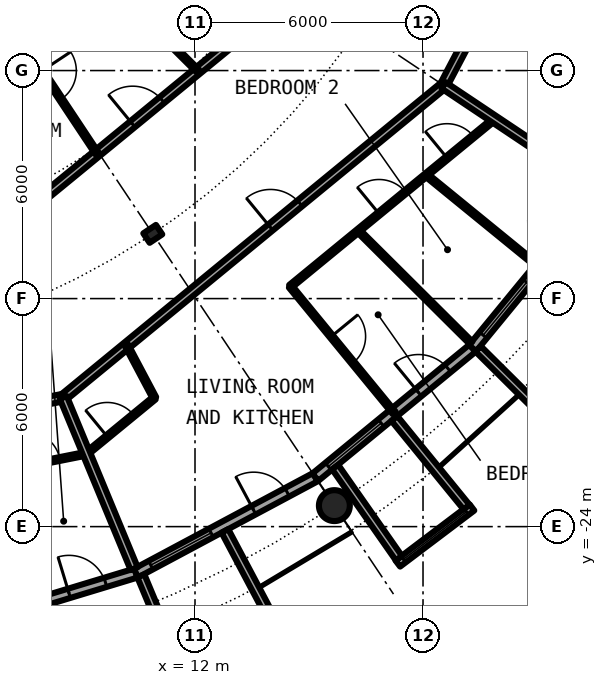
"""IFC4 building model, lengths in metres.
Left out: names, types, materials, properties, quantities, classifications, styles, units other than length and angle.
Written with IfcOpenShell. Run it as: python <this file> out.ifc"""

import sys

from ifc_helpers import new_model, si_unit, direction, frame, frame_2d, origin, origin_2d, place, context, subcontext, project, spatial, rectangle, circle, hollow_circle, i_section, extrude, element, fill, save


model = new_model("IFC4")
c1 = context("Model", 3, precision=1e-05, world=origin(), true_north=direction((0.0, 1.0)))
c2 = subcontext(c1, "Body", "Model", "MODEL_VIEW")
j1 = project(units=[si_unit("LENGTHUNIT", "METRE"), si_unit("PLANEANGLEUNIT", "RADIAN")], contexts=[c1])
p1 = place(None, origin())
s1 = spatial("IfcSite", under=j1, at=p1, CompositionType="ELEMENT")
p2 = place(p1, origin())
s2 = spatial("IfcBuilding", under=s1, at=p2, CompositionType="ELEMENT")
p3 = place(p2, frame((0.0, 0.0, 199.35)))
s3 = spatial("IfcBuildingStorey", under=s2, at=p3, CompositionType="ELEMENT", Elevation=199.35)
p4 = place(p3, frame((15.667, -23.448, 0.0), z_axis=(0.0, 0.0, 1.0), x_axis=(1.0, 0.0, 0.0)))
e1 = element("IfcColumn", 1, at=p4, inside=s3, PredefinedType="COLUMN", context=c2, shape_type="SweptSolid", body=[
    extrude(hollow_circle(Radius=0.406, WallThickness=0.03, at=origin_2d()), origin(), (0.0, 0.0, 1.0), 3.05),
])
p5 = place(p3, frame((10.889, -16.297, 0.0), z_axis=(0.0, 0.0, 1.0), x_axis=(0.55557023302, -0.831469612303, 0.0)))
e2 = element("IfcColumn", 2, at=p5, inside=s3, PredefinedType="COLUMN", context=c2, shape_type="SweptSolid", body=[
    extrude(i_section(OverallWidth=0.3, OverallDepth=0.4, WebThickness=0.013, FlangeThickness=0.024, FilletRadius=0.027, at=origin_2d()), origin(), (0.0, 0.0, 1.0), 3.05),
])
p6 = place(p3, frame((5.326, -26.775, 0.0), z_axis=(0.0, 0.0, 1.0), x_axis=(0.956965678721, 0.290201119486, 0.0)))
e3 = element("IfcWall", 3, at=p6, inside=s3, PredefinedType="SOLIDWALL", context=c2, shape_type="SweptSolid", body=[
    extrude(rectangle(XDim=5.351, YDim=0.25, at=frame_2d((2.676, 0.0))), origin(), (0.0, 0.0, 1.0), 2.7),
])
p7 = place(p6, frame((0.441, 0.0, 0.3)))
e4 = element("IfcOpeningElement", 4, at=p7, cuts=e3, PredefinedType="OPENING", context=c2, shape_type="SweptSolid", body=[
    extrude(rectangle(XDim=1.8, YDim=2.1, at=frame_2d((0.9, 1.05))), frame((0.0, 0.135, 0.0), z_axis=(0.0, -1.0, 0.0), x_axis=(1.0, 0.0, 0.0)), (0.0, 0.0, 1.0), 0.27),
])
p8 = place(p6, frame((3.51, 0.0, 0.0)))
e5 = element("IfcOpeningElement", 5, at=p8, cuts=e3, PredefinedType="OPENING", context=c2, shape_type="SweptSolid", body=[
    extrude(rectangle(XDim=1.0, YDim=2.2, at=frame_2d((0.5, 1.1))), frame((0.0, 0.135, 0.0), z_axis=(0.0, -1.0, 0.0), x_axis=(1.0, 0.0, 0.0)), (0.0, 0.0, 1.0), 0.27),
])
p9 = place(p3, frame((10.447, -25.222, 0.0), z_axis=(0.0, 0.0, 1.0), x_axis=(0.881915646801, 0.471407246368, 0.0)))
e6 = element("IfcWall", 6, at=p9, inside=s3, PredefinedType="SOLIDWALL", context=c2, shape_type="SweptSolid", body=[
    extrude(rectangle(XDim=5.352, YDim=0.25, at=frame_2d((2.676, 0.0))), origin(), (0.0, 0.0, 1.0), 2.7),
])
p10 = place(p9, frame((0.441, 0.0, 0.3)))
e7 = element("IfcOpeningElement", 7, at=p10, cuts=e6, PredefinedType="OPENING", context=c2, shape_type="SweptSolid", body=[
    extrude(rectangle(XDim=1.8, YDim=2.1, at=frame_2d((0.9, 1.05))), frame((0.0, 0.135, 0.0), z_axis=(0.0, -1.0, 0.0), x_axis=(1.0, 0.0, 0.0)), (0.0, 0.0, 1.0), 0.27),
])
p11 = place(p9, frame((3.51, 0.0, 0.0)))
e8 = element("IfcOpeningElement", 8, at=p11, cuts=e6, PredefinedType="OPENING", context=c2, shape_type="SweptSolid", body=[
    extrude(rectangle(XDim=1.0, YDim=2.2, at=frame_2d((0.5, 1.1))), frame((0.0, 0.135, 0.0), z_axis=(0.0, -1.0, 0.0), x_axis=(1.0, 0.0, 0.0)), (0.0, 0.0, 1.0), 0.27),
])
p12 = place(p3, frame((10.575, -25.295, -0.03), z_axis=(0.0, 0.0, 1.0), x_axis=(0.385697364644, -0.922625353492, 0.0)))
e9 = element("IfcWall", 9, at=p12, inside=s3, PredefinedType="SOLIDWALL", context=c2, shape_type="SweptSolid", body=[
    extrude(rectangle(XDim=2.883, YDim=0.2, at=frame_2d((1.442, 0.0))), origin(), (0.0, 0.0, 1.0), 2.73),
])
p13 = place(p3, frame((12.787, -24.113, -0.03), z_axis=(0.0, 0.0, 1.0), x_axis=(0.468365282436, -0.883534924159, 0.0)))
e10 = element("IfcWall", 10, at=p13, inside=s3, PredefinedType="SOLIDWALL", context=c2, shape_type="SweptSolid", body=[
    extrude(rectangle(XDim=3.006, YDim=0.2, at=frame_2d((1.503, 0.0))), origin(), (0.0, 0.0, 1.0), 2.73),
])
p14 = place(p3, frame((15.167, -22.699, 0.0), z_axis=(0.0, 0.0, 1.0), x_axis=(0.773019449054, 0.634382322723, 0.0)))
e11 = element("IfcWall", 11, at=p14, inside=s3, PredefinedType="SOLIDWALL", context=c2, shape_type="SweptSolid", body=[
    extrude(rectangle(XDim=5.352, YDim=0.25, at=frame_2d((2.676, 0.0))), origin(), (0.0, 0.0, 1.0), 2.7),
])
p15 = place(p14, frame((0.441, 0.0, 0.3)))
e12 = element("IfcOpeningElement", 12, at=p15, cuts=e11, PredefinedType="OPENING", context=c2, shape_type="SweptSolid", body=[
    extrude(rectangle(XDim=1.8, YDim=2.1, at=frame_2d((0.9, 1.05))), frame((0.0, 0.135, 0.0), z_axis=(0.0, -1.0, 0.0), x_axis=(1.0, 0.0, 0.0)), (0.0, 0.0, 1.0), 0.27),
])
p16 = place(p14, frame((3.51, 0.0, 0.0)))
e13 = element("IfcOpeningElement", 13, at=p16, cuts=e11, PredefinedType="OPENING", context=c2, shape_type="SweptSolid", body=[
    extrude(rectangle(XDim=1.0, YDim=2.2, at=frame_2d((0.5, 1.1))), frame((0.0, 0.135, 0.0), z_axis=(0.0, -1.0, 0.0), x_axis=(1.0, 0.0, 0.0)), (0.0, 0.0, 1.0), 0.27),
])
p17 = place(p3, frame((17.337, -24.972, -0.03), z_axis=(0.0, 0.0, 1.0), x_axis=(0.797887588059, 0.602806268067, 0.0)))
e14 = element("IfcWall", 14, at=p17, inside=s3, PredefinedType="SOLIDWALL", context=c2, shape_type="SweptSolid", body=[
    extrude(rectangle(XDim=2.447, YDim=0.2, at=frame_2d((1.223, 0.0))), origin(), (0.0, 0.0, 1.0), 2.73),
])
p18 = place(p17, frame((0.183, 0.0, 0.33)))
e15 = element("IfcOpeningElement", 15, at=p18, cuts=e14, PredefinedType="OPENING", context=c2, shape_type="SweptSolid", body=[
    extrude(circle(Radius=1.04, at=frame_2d((1.04, 1.04))), frame((0.0, 0.11, 0.0), z_axis=(0.0, -1.0, 0.0), x_axis=(1.0, 0.0, 0.0)), (0.0, 0.0, 1.0), 0.22),
])
p19 = place(p3, frame((15.688, -22.433, -0.03), z_axis=(0.0, 0.0, 1.0), x_axis=(0.573260687834, -0.819373043115, 0.0)))
e16 = element("IfcWall", 16, at=p19, inside=s3, PredefinedType="SOLIDWALL", context=c2, shape_type="SweptSolid", body=[
    extrude(rectangle(XDim=2.925, YDim=0.2, at=frame_2d((1.463, 0.0))), origin(), (0.0, 0.0, 1.0), 2.73),
])
p20 = place(p3, frame((17.246, -21.155, -0.03), z_axis=(0.0, 0.0, 1.0), x_axis=(0.631741648902, -0.775179004516, 0.0)))
e17 = element("IfcWall", 17, at=p20, inside=s3, PredefinedType="SOLIDWALL", context=c2, shape_type="SweptSolid", body=[
    extrude(rectangle(XDim=3.006, YDim=0.2, at=frame_2d((1.503, 0.0))), origin(), (0.0, 0.0, 1.0), 2.73),
])
p21 = place(p3, frame((19.304, -19.304, 0.0), z_axis=(0.0, 0.0, 1.0), x_axis=(0.634382322723, 0.773019449054, 0.0)))
e18 = element("IfcWall", 18, at=p21, inside=s3, PredefinedType="SOLIDWALL", context=c2, shape_type="SweptSolid", body=[
    extrude(rectangle(XDim=5.352, YDim=0.25, at=frame_2d((2.676, 0.0))), origin(), (0.0, 0.0, 1.0), 2.7),
])
p22 = place(p21, frame((0.441, 0.0, 0.3)))
e19 = element("IfcOpeningElement", 19, at=p22, cuts=e18, PredefinedType="OPENING", context=c2, shape_type="SweptSolid", body=[
    extrude(rectangle(XDim=1.8, YDim=2.1, at=frame_2d((0.9, 1.05))), frame((0.0, 0.135, 0.0), z_axis=(0.0, -1.0, 0.0), x_axis=(1.0, 0.0, 0.0)), (0.0, 0.0, 1.0), 0.27),
])
p23 = place(p21, frame((3.51, 0.0, 0.0)))
e20 = element("IfcOpeningElement", 20, at=p23, cuts=e18, PredefinedType="OPENING", context=c2, shape_type="SweptSolid", body=[
    extrude(rectangle(XDim=1.0, YDim=2.2, at=frame_2d((0.5, 1.1))), frame((0.0, 0.135, 0.0), z_axis=(0.0, -1.0, 0.0), x_axis=(1.0, 0.0, 0.0)), (0.0, 0.0, 1.0), 0.27),
])
p24 = place(p3, frame((19.45, -19.323, -0.03), z_axis=(0.0, 0.0, 1.0), x_axis=(0.709727076896, -0.704476739375, 0.0)))
e21 = element("IfcWall", 21, at=p24, inside=s3, PredefinedType="SOLIDWALL", context=c2, shape_type="SweptSolid", body=[
    extrude(rectangle(XDim=2.883, YDim=0.2, at=frame_2d((1.441, 0.0))), origin(), (0.0, 0.0, 1.0), 2.73),
])
p25 = place(p3, frame((4.577, -22.989, 0.0), z_axis=(0.0, 0.0, 1.0), x_axis=(0.980813600024, 0.194947895622, 0.0)))
e22 = element("IfcWall", 22, at=p25, inside=s3, PredefinedType="PARTITIONING", context=c2, shape_type="SweptSolid", body=[
    extrude(rectangle(XDim=4.662, YDim=0.1, at=frame_2d((2.331, 0.0))), origin(), (0.0, 0.0, 1.0), 2.7),
])
p26 = place(p25, frame((3.043, 0.0, 0.0)))
e23 = element("IfcOpeningElement", 23, at=p26, cuts=e22, PredefinedType="OPENING", context=c2, shape_type="SweptSolid", body=[
    extrude(rectangle(XDim=0.9, YDim=2.3, at=frame_2d((0.45, 1.15))), frame((0.0, 0.06, 0.0), z_axis=(0.0, -1.0, 0.0), x_axis=(1.0, 0.0, 0.0)), (0.0, 0.0, 1.0), 0.12),
])
p27 = place(p3, frame((9.146, -22.081, 0.0), z_axis=(0.0, 0.0, 1.0), x_axis=(0.773095932958, 0.634289112663, 0.0)))
e24 = element("IfcWall", 24, at=p27, inside=s3, PredefinedType="PARTITIONING", context=c2, shape_type="SweptSolid", body=[
    extrude(rectangle(XDim=2.313, YDim=0.1, at=frame_2d((1.156, 0.0))), origin(), (0.0, 0.0, 1.0), 2.7),
])
p28 = place(p27, frame((0.706, 0.0, 0.0)))
e25 = element("IfcOpeningElement", 25, at=p28, cuts=e24, PredefinedType="OPENING", context=c2, shape_type="SweptSolid", body=[
    extrude(rectangle(XDim=0.9, YDim=2.3, at=frame_2d((0.45, 1.15))), frame((0.0, 0.06, 0.0), z_axis=(0.0, -1.0, 0.0), x_axis=(1.0, 0.0, 0.0)), (0.0, 0.0, 1.0), 0.12),
])
p29 = place(p3, frame((14.508, -17.681, 0.0), z_axis=(0.0, 0.0, 1.0), x_axis=(0.773155647559, 0.634216323227, 0.0)))
e26 = element("IfcWall", 26, at=p29, inside=s3, PredefinedType="PARTITIONING", context=c2, shape_type="SweptSolid", body=[
    extrude(rectangle(XDim=6.939, YDim=0.1, at=frame_2d((3.469, 0.0))), origin(), (0.0, 0.0, 1.0), 2.7),
])
p30 = place(p29, frame((3.019, 0.0, 0.0)))
e27 = element("IfcOpeningElement", 27, at=p30, cuts=e26, PredefinedType="OPENING", context=c2, shape_type="SweptSolid", body=[
    extrude(rectangle(XDim=0.9, YDim=2.3, at=frame_2d((0.45, 1.15))), frame((0.0, 0.06, 0.0), z_axis=(0.0, -1.0, 0.0), x_axis=(1.0, 0.0, 0.0)), (0.0, 0.0, 1.0), 0.12),
])
p31 = place(p29, frame((5.334, 0.0, 0.0)))
e28 = element("IfcOpeningElement", 28, at=p31, cuts=e26, PredefinedType="OPENING", context=c2, shape_type="SweptSolid", body=[
    extrude(rectangle(XDim=0.9, YDim=2.3, at=frame_2d((0.45, 1.15))), frame((0.0, 0.06, 0.0), z_axis=(0.0, -1.0, 0.0), x_axis=(1.0, 0.0, 0.0)), (0.0, 0.0, 1.0), 0.12),
])
p32 = place(p3, frame((18.542, -12.389, 0.0), z_axis=(0.0, 0.0, 1.0), x_axis=(0.465359652486, 0.885121683068, 0.0)))
e29 = element("IfcWall", 29, at=p32, inside=s3, PredefinedType="PARTITIONING", context=c2, shape_type="SweptSolid", body=[
    extrude(rectangle(XDim=1.665, YDim=0.2, at=frame_2d((0.833, 0.0))), origin(), (0.0, 0.0, 1.0), 2.7),
])
p33 = place(p3, frame((0.0, -22.3, 0.0), z_axis=(0.0, 0.0, 1.0), x_axis=(0.980813117615, 0.194950322682, 0.0)))
e30 = element("IfcWall", 30, at=p33, inside=s3, PredefinedType="PARTITIONING", context=c2, shape_type="SweptSolid", body=[
    extrude(rectangle(XDim=8.7, YDim=0.2, at=frame_2d((4.35, 0.0))), origin(), (0.0, 0.0, 1.0), 2.7),
])
p34 = place(p33, frame((4.938, 0.0, 0.0)))
e31 = element("IfcOpeningElement", 31, at=p34, cuts=e30, PredefinedType="OPENING", context=c2, shape_type="SweptSolid", body=[
    extrude(rectangle(XDim=1.0, YDim=2.3, at=frame_2d((0.5, 1.15))), frame((0.0, 0.11, 0.0), z_axis=(0.0, -1.0, 0.0), x_axis=(1.0, 0.0, 0.0)), (0.0, 0.0, 1.0), 0.22),
])
p35 = place(p3, frame((8.534, -20.603, 0.0), z_axis=(0.0, 0.0, 1.0), x_axis=(0.772983503654, 0.634426121056, 0.0)))
e32 = element("IfcWall", 32, at=p35, inside=s3, PredefinedType="PARTITIONING", context=c2, shape_type="SweptSolid", body=[
    extrude(rectangle(XDim=12.947, YDim=0.2, at=frame_2d((6.474, 0.0))), origin(), (0.0, 0.0, 1.0), 2.7),
])
p36 = place(p35, frame((7.053, 0.0, 0.0)))
e33 = element("IfcOpeningElement", 33, at=p36, cuts=e32, PredefinedType="OPENING", context=c2, shape_type="SweptSolid", body=[
    extrude(rectangle(XDim=1.0, YDim=2.3, at=frame_2d((0.5, 1.15))), frame((0.0, 0.11, 0.0), z_axis=(0.0, -1.0, 0.0), x_axis=(1.0, 0.0, 0.0)), (0.0, 0.0, 1.0), 0.22),
])
p37 = place(p3, frame((6.773, -16.353, 0.0), z_axis=(0.0, 0.0, 1.0), x_axis=(0.773034536097, 0.634363938131, 0.0)))
e34 = element("IfcWall", 34, at=p37, inside=s3, PredefinedType="PARTITIONING", context=c2, shape_type="SweptSolid", body=[
    extrude(rectangle(XDim=10.277, YDim=0.2, at=frame_2d((5.138, 0.0))), origin(), (0.0, 0.0, 1.0), 2.7),
])
p38 = place(p37, frame((4.638, 0.0, 0.0)))
e35 = element("IfcOpeningElement", 35, at=p38, cuts=e34, PredefinedType="OPENING", context=c2, shape_type="SweptSolid", body=[
    extrude(rectangle(XDim=1.0, YDim=2.3, at=frame_2d((0.5, 1.15))), frame((0.0, 0.11, 0.0), z_axis=(0.0, -1.0, 0.0), x_axis=(1.0, 0.0, 0.0)), (0.0, 0.0, 1.0), 0.22),
])
p39 = place(p3, frame((7.031, -10.582, 0.0), z_axis=(0.0, 0.0, 1.0), x_axis=(0.553303732327, -0.832979579457, 0.0)))
e36 = element("IfcWall", 36, at=p39, inside=s3, PredefinedType="PARTITIONING", context=c2, shape_type="SweptSolid", body=[
    extrude(rectangle(XDim=4.319, YDim=0.1, at=frame_2d((2.16, 0.0))), origin(), (0.0, 0.0, 1.0), 2.7),
])
p40 = place(p39, frame((1.71, 0.0, 0.0)))
e37 = element("IfcOpeningElement", 37, at=p40, cuts=e36, PredefinedType="OPENING", context=c2, shape_type="SweptSolid", body=[
    extrude(rectangle(XDim=0.9, YDim=2.3, at=frame_2d((0.45, 1.15))), frame((0.0, 0.06, 0.0), z_axis=(0.0, -1.0, 0.0), x_axis=(1.0, 0.0, 0.0)), (0.0, 0.0, 1.0), 0.12),
])
p41 = place(p3, frame((8.534, -20.603, 0.0), z_axis=(0.0, 0.0, 1.0), x_axis=(0.382651153718, -0.923892902104, 0.0)))
e38 = element("IfcWall", 38, at=p41, inside=s3, PredefinedType="PARTITIONING", context=c2, shape_type="SweptSolid", body=[
    extrude(rectangle(XDim=4.874, YDim=0.2, at=frame_2d((2.437, 0.0))), origin(), (0.0, 0.0, 1.0), 2.7),
])
p42 = place(p3, frame((9.097, -9.05, 0.0), z_axis=(0.0, 0.0, 1.0), x_axis=(0.708909651863, -0.705299302067, 0.0)))
e39 = element("IfcWall", 39, at=p42, inside=s3, PredefinedType="PARTITIONING", context=c2, shape_type="SweptSolid", body=[
    extrude(rectangle(XDim=4.193, YDim=0.1, at=frame_2d((2.096, 0.0))), origin(), (0.0, 0.0, 1.0), 2.7),
])
p43 = place(p42, frame((1.646, 0.0, 0.0)))
e40 = element("IfcOpeningElement", 40, at=p43, cuts=e39, PredefinedType="OPENING", context=c2, shape_type="SweptSolid", body=[
    extrude(rectangle(XDim=0.9, YDim=2.3, at=frame_2d((0.45, 1.15))), frame((0.0, 0.06, 0.0), z_axis=(0.0, -1.0, 0.0), x_axis=(1.0, 0.0, 0.0)), (0.0, 0.0, 1.0), 0.12),
])
p44 = place(p3, frame((10.202, -19.234, 0.0), z_axis=(0.0, 0.0, 1.0), x_axis=(0.468648615763, -0.88338466986, 0.0)))
e41 = element("IfcWall", 41, at=p44, inside=s3, PredefinedType="PARTITIONING", context=c2, shape_type="SweptSolid", body=[
    extrude(rectangle(XDim=1.562, YDim=0.1, at=frame_2d((0.781, 0.0))), origin(), (0.0, 0.0, 1.0), 2.7),
])
p45 = place(p3, frame((14.509, -17.679, 0.0), z_axis=(0.0, 0.0, 1.0), x_axis=(0.634342681687, -0.77305197897, 0.0)))
e42 = element("IfcWall", 42, at=p45, inside=s3, PredefinedType="PARTITIONING", context=c2, shape_type="SweptSolid", body=[
    extrude(rectangle(XDim=4.305, YDim=0.1, at=frame_2d((2.153, 0.0))), origin(), (0.0, 0.0, 1.0), 2.7),
])
p46 = place(p45, frame((1.703, 0.0, 0.0)))
e43 = element("IfcOpeningElement", 43, at=p46, cuts=e42, PredefinedType="OPENING", context=c2, shape_type="SweptSolid", body=[
    extrude(rectangle(XDim=0.9, YDim=2.3, at=frame_2d((0.45, 1.15))), frame((0.0, 0.06, 0.0), z_axis=(0.0, -1.0, 0.0), x_axis=(1.0, 0.0, 0.0)), (0.0, 0.0, 1.0), 0.12),
])
p47 = place(p3, frame((16.296, -16.213, 0.0), z_axis=(0.0, 0.0, 1.0), x_axis=(0.708999026534, -0.705209458511, 0.0)))
e44 = element("IfcWall", 44, at=p47, inside=s3, PredefinedType="PARTITIONING", context=c2, shape_type="SweptSolid", body=[
    extrude(rectangle(XDim=4.188, YDim=0.1, at=frame_2d((2.094, 0.0))), origin(), (0.0, 0.0, 1.0), 2.7),
])
p48 = place(p3, frame((18.084, -14.745, 0.0), z_axis=(0.0, 0.0, 1.0), x_axis=(0.77495020745, -0.632022290724, 0.0)))
e45 = element("IfcWall", 45, at=p48, inside=s3, PredefinedType="PARTITIONING", context=c2, shape_type="SweptSolid", body=[
    extrude(rectangle(XDim=3.842, YDim=0.1, at=frame_2d((1.921, 0.0))), origin(), (0.0, 0.0, 1.0), 2.7),
])
p49 = place(p3, frame((18.542, -12.389, 0.0), z_axis=(0.0, 0.0, 1.0), x_axis=(0.831387096605, -0.55569370664, 0.0)))
e46 = element("IfcWall", 46, at=p49, inside=s3, PredefinedType="PARTITIONING", context=c2, shape_type="SweptSolid", body=[
    extrude(rectangle(XDim=4.875, YDim=0.2, at=frame_2d((2.438, 0.0))), origin(), (0.0, 0.0, 1.0), 2.7),
])
p50 = place(p8, origin())
e47 = element("IfcDoor", 47, at=p50, inside=s3, OperationType="SINGLE_SWING_LEFT", PredefinedType="DOOR", context=c2, shape_type="SweptSolid", body=[
    extrude(rectangle(XDim=1.0, YDim=2.2, at=frame_2d((0.5, 1.1))), frame((0.0, 0.025, 0.0), z_axis=(0.0, -1.0, 0.0), x_axis=(1.0, 0.0, 0.0)), (0.0, 0.0, 1.0), 0.05),
])
fill(e5, e47)
p51 = place(p10, origin())
e48 = element("IfcWindow", 48, at=p51, inside=s3, PartitioningType="SINGLE_PANEL", PredefinedType="WINDOW", context=c2, shape_type="SweptSolid", body=[
    extrude(rectangle(XDim=1.8, YDim=2.1, at=frame_2d((0.9, 1.05))), frame((0.0, 0.03, 0.0), z_axis=(0.0, -1.0, 0.0), x_axis=(1.0, 0.0, 0.0)), (0.0, 0.0, 1.0), 0.06),
])
fill(e7, e48)
p52 = place(p11, origin())
e49 = element("IfcDoor", 49, at=p52, inside=s3, OperationType="SINGLE_SWING_LEFT", PredefinedType="DOOR", context=c2, shape_type="SweptSolid", body=[
    extrude(rectangle(XDim=1.0, YDim=2.2, at=frame_2d((0.5, 1.1))), frame((0.0, 0.025, 0.0), z_axis=(0.0, -1.0, 0.0), x_axis=(1.0, 0.0, 0.0)), (0.0, 0.0, 1.0), 0.05),
])
fill(e8, e49)
p53 = place(p15, origin())
e50 = element("IfcWindow", 50, at=p53, inside=s3, PartitioningType="SINGLE_PANEL", PredefinedType="WINDOW", context=c2, shape_type="SweptSolid", body=[
    extrude(rectangle(XDim=1.8, YDim=2.1, at=frame_2d((0.9, 1.05))), frame((0.0, 0.03, 0.0), z_axis=(0.0, -1.0, 0.0), x_axis=(1.0, 0.0, 0.0)), (0.0, 0.0, 1.0), 0.06),
])
fill(e12, e50)
p54 = place(p18, origin())
e51 = element("IfcWindow", 51, at=p54, inside=s3, PartitioningType="SINGLE_PANEL", PredefinedType="WINDOW", context=c2, shape_type="SweptSolid", body=[
    extrude(circle(Radius=1.04, at=frame_2d((1.04, 1.04))), frame((0.0, 0.03, 0.0), z_axis=(0.0, -1.0, 0.0), x_axis=(1.0, 0.0, 0.0)), (0.0, 0.0, 1.0), 0.06),
])
fill(e15, e51)
p55 = place(p16, origin())
e52 = element("IfcDoor", 52, at=p55, inside=s3, OperationType="SINGLE_SWING_LEFT", PredefinedType="DOOR", context=c2, shape_type="SweptSolid", body=[
    extrude(rectangle(XDim=1.0, YDim=2.2, at=frame_2d((0.5, 1.1))), frame((0.0, 0.025, 0.0), z_axis=(0.0, -1.0, 0.0), x_axis=(1.0, 0.0, 0.0)), (0.0, 0.0, 1.0), 0.05),
])
fill(e13, e52)
p56 = place(p22, origin())
e53 = element("IfcWindow", 53, at=p56, inside=s3, PartitioningType="SINGLE_PANEL", PredefinedType="WINDOW", context=c2, shape_type="SweptSolid", body=[
    extrude(rectangle(XDim=1.8, YDim=2.1, at=frame_2d((0.9, 1.05))), frame((0.0, 0.03, 0.0), z_axis=(0.0, -1.0, 0.0), x_axis=(1.0, 0.0, 0.0)), (0.0, 0.0, 1.0), 0.06),
])
fill(e19, e53)
p57 = place(p26, origin())
e54 = element("IfcDoor", 54, at=p57, inside=s3, OperationType="SINGLE_SWING_RIGHT", PredefinedType="DOOR", context=c2, shape_type="SweptSolid", body=[
    extrude(rectangle(XDim=0.9, YDim=2.3, at=frame_2d((0.45, 1.15))), frame((0.0, 0.025, 0.0), z_axis=(0.0, -1.0, 0.0), x_axis=(1.0, 0.0, 0.0)), (0.0, 0.0, 1.0), 0.05),
])
fill(e23, e54)
p58 = place(p36, origin())
e55 = element("IfcDoor", 55, at=p58, inside=s3, OperationType="SINGLE_SWING_RIGHT", PredefinedType="DOOR", context=c2, shape_type="SweptSolid", body=[
    extrude(rectangle(XDim=1.0, YDim=2.3, at=frame_2d((0.5, 1.15))), frame((0.0, 0.025, 0.0), z_axis=(0.0, -1.0, 0.0), x_axis=(1.0, 0.0, 0.0)), (0.0, 0.0, 1.0), 0.05),
])
fill(e33, e55)
p59 = place(p28, origin())
e56 = element("IfcDoor", 56, at=p59, inside=s3, OperationType="SINGLE_SWING_LEFT", PredefinedType="DOOR", context=c2, shape_type="SweptSolid", body=[
    extrude(rectangle(XDim=0.9, YDim=2.3, at=frame_2d((0.45, 1.15))), frame((0.0, 0.025, 0.0), z_axis=(0.0, -1.0, 0.0), x_axis=(1.0, 0.0, 0.0)), (0.0, 0.0, 1.0), 0.05),
])
fill(e25, e56)
p60 = place(p46, origin())
e57 = element("IfcDoor", 57, at=p60, inside=s3, OperationType="SINGLE_SWING_RIGHT", PredefinedType="DOOR", context=c2, shape_type="SweptSolid", body=[
    extrude(rectangle(XDim=0.9, YDim=2.3, at=frame_2d((0.45, 1.15))), frame((0.0, 0.025, 0.0), z_axis=(0.0, -1.0, 0.0), x_axis=(1.0, 0.0, 0.0)), (0.0, 0.0, 1.0), 0.05),
])
fill(e43, e57)
p61 = place(p30, origin())
e58 = element("IfcDoor", 58, at=p61, inside=s3, OperationType="SINGLE_SWING_LEFT", PredefinedType="DOOR", context=c2, shape_type="SweptSolid", body=[
    extrude(rectangle(XDim=0.9, YDim=2.3, at=frame_2d((0.45, 1.15))), frame((0.0, 0.025, 0.0), z_axis=(0.0, -1.0, 0.0), x_axis=(1.0, 0.0, 0.0)), (0.0, 0.0, 1.0), 0.05),
])
fill(e27, e58)
p62 = place(p31, origin())
e59 = element("IfcDoor", 59, at=p62, inside=s3, OperationType="SINGLE_SWING_RIGHT", PredefinedType="DOOR", context=c2, shape_type="SweptSolid", body=[
    extrude(rectangle(XDim=0.9, YDim=2.3, at=frame_2d((0.45, 1.15))), frame((0.0, 0.025, 0.0), z_axis=(0.0, -1.0, 0.0), x_axis=(1.0, 0.0, 0.0)), (0.0, 0.0, 1.0), 0.05),
])
fill(e28, e59)
p63 = place(p38, origin())
e60 = element("IfcDoor", 60, at=p63, inside=s3, OperationType="SINGLE_SWING_RIGHT", PredefinedType="DOOR", context=c2, shape_type="SweptSolid", body=[
    extrude(rectangle(XDim=1.0, YDim=2.3, at=frame_2d((0.5, 1.15))), frame((0.0, 0.025, 0.0), z_axis=(0.0, -1.0, 0.0), x_axis=(1.0, 0.0, 0.0)), (0.0, 0.0, 1.0), 0.05),
])
fill(e35, e60)
p64 = place(p40, origin())
e61 = element("IfcDoor", 61, at=p64, inside=s3, OperationType="SINGLE_SWING_RIGHT", PredefinedType="DOOR", context=c2, shape_type="SweptSolid", body=[
    extrude(rectangle(XDim=0.9, YDim=2.3, at=frame_2d((0.45, 1.15))), frame((0.0, 0.025, 0.0), z_axis=(0.0, -1.0, 0.0), x_axis=(1.0, 0.0, 0.0)), (0.0, 0.0, 1.0), 0.05),
])
fill(e37, e61)
save(model, sys.argv[1])
